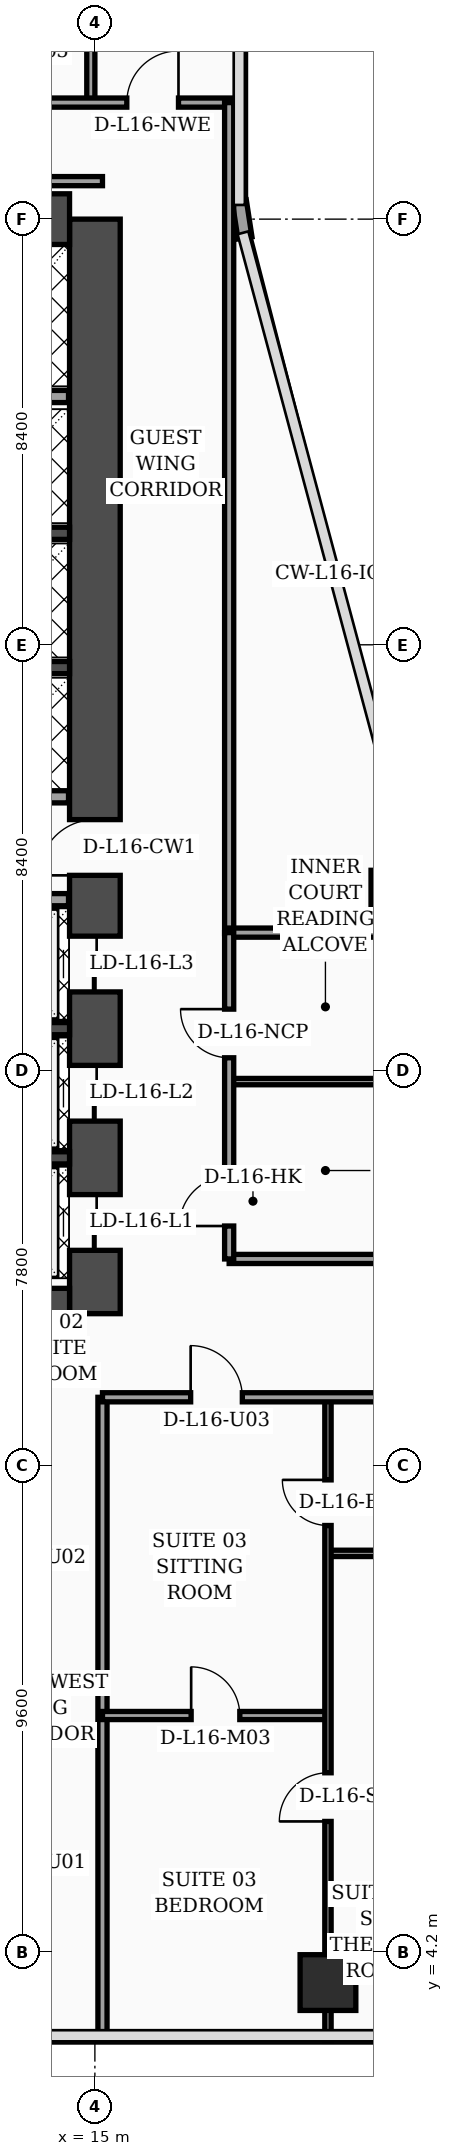
"""IFC4 building model, lengths in metres.
Left out: names, types, materials, properties, quantities, classifications, styles, units other than length and angle.
Written with IfcOpenShell. Run it as: python <this file> out.ifc"""

import sys

from ifc_helpers import new_model, si_unit, direction, frame, frame_2d, origin, origin_2d, place, context, subcontext, project, spatial, rectangle, hollow_rectangle, extrude, element, fill, save


model = new_model("IFC4")
c1 = context("Model", 3, precision=1e-05, world=origin(), true_north=direction((0.0, 1.0)))
c2 = subcontext(c1, "Body", "Model", "MODEL_VIEW")
j1 = project(units=[si_unit("LENGTHUNIT", "METRE"), si_unit("PLANEANGLEUNIT", "RADIAN")], contexts=[c1])
p1 = place(None, origin())
s1 = spatial("IfcSite", under=j1, at=p1, CompositionType="ELEMENT")
p2 = place(p1, origin())
s2 = spatial("IfcBuilding", under=s1, at=p2, CompositionType="ELEMENT")
p3 = place(p2, frame((0.0, 0.0, 69.8)))
s3 = spatial("IfcBuildingStorey", under=s2, at=p3, CompositionType="ELEMENT", Elevation=69.8)
p4 = place(p3, frame((15.0, 16.8, 0.0), z_axis=(0.0, 0.0, 1.0), x_axis=(0.0, 1.0, 0.0)))
e1 = element("IfcWall", 1, at=p4, inside=s3, PredefinedType="SHEAR", context=c2, shape_type="SweptSolid", body=[
    extrude(rectangle(XDim=21.6, YDim=1.0, at=frame_2d((10.8, 0.0))), origin(), (0.0, 0.0, 1.0), 3.56),
])
p5 = place(p4, frame((8.65, 0.0, 0.0)))
e2 = element("IfcOpeningElement", 2, at=p5, cuts=e1, PredefinedType="OPENING", context=c2, shape_type="SweptSolid", body=[
    extrude(rectangle(XDim=1.1, YDim=2.2, at=frame_2d((0.55, 1.1))), frame((0.0, 0.51, 0.0), z_axis=(0.0, -1.0, 0.0), x_axis=(1.0, 0.0, 0.0)), (0.0, 0.0, 1.0), 1.02),
])
p6 = place(p4, frame((1.25, 0.0, 0.0)))
e3 = element("IfcOpeningElement", 3, at=p6, cuts=e1, PredefinedType="OPENING", context=c2, shape_type="SweptSolid", body=[
    extrude(rectangle(XDim=1.1, YDim=2.2, at=frame_2d((0.55, 1.1))), frame((0.0, 0.51, 0.0), z_axis=(0.0, -1.0, 0.0), x_axis=(1.0, 0.0, 0.0)), (0.0, 0.0, 1.0), 1.02),
])
p7 = place(p4, frame((3.8, 0.0, 0.0)))
e4 = element("IfcOpeningElement", 4, at=p7, cuts=e1, PredefinedType="OPENING", context=c2, shape_type="SweptSolid", body=[
    extrude(rectangle(XDim=1.1, YDim=2.2, at=frame_2d((0.55, 1.1))), frame((0.0, 0.51, 0.0), z_axis=(0.0, -1.0, 0.0), x_axis=(1.0, 0.0, 0.0)), (0.0, 0.0, 1.0), 1.02),
])
p8 = place(p4, frame((6.35, 0.0, 0.0)))
e5 = element("IfcOpeningElement", 5, at=p8, cuts=e1, PredefinedType="OPENING", context=c2, shape_type="SweptSolid", body=[
    extrude(rectangle(XDim=1.1, YDim=2.2, at=frame_2d((0.55, 1.1))), frame((0.0, 0.51, 0.0), z_axis=(0.0, -1.0, 0.0), x_axis=(1.0, 0.0, 0.0)), (0.0, 0.0, 1.0), 1.02),
])
for number, where, z_axis, x_axis in (
    (6, (4.7, 38.4, 0.0), (0.0, 0.0, 1.0), (1.0, 0.0, 0.0)),
    (7, (4.7, 16.8, 0.0), (0.0, 0.0, 1.0), (1.0, 0.0, 0.0)),
):
    element("IfcWall", number, at=place(p3, frame(where, z_axis=z_axis, x_axis=x_axis)), inside=s3, PredefinedType="SHEAR", context=c2, shape_type="SweptSolid", body=[
        extrude(rectangle(XDim=9.8, YDim=1.0, at=frame_2d((4.9, 0.0))), origin(), (0.0, 0.0, 1.0), 3.56),
    ])
for number, where, z_axis, x_axis in (
    (8, (12.18, 19.875, 0.0), (0.0, 0.0, 1.0), (1.0, 0.0, 0.0)),
    (9, (12.18, 22.425, 0.0), (0.0, 0.0, 1.0), (1.0, 0.0, 0.0)),
    (10, (12.18, 29.55, 0.0), (0.0, 0.0, 1.0), (1.0, 0.0, 0.0)),
    (11, (12.18, 32.2, 0.0), (0.0, 0.0, 1.0), (1.0, 0.0, 0.0)),
):
    element("IfcWall", number, at=place(p3, frame(where, z_axis=z_axis, x_axis=x_axis)), inside=s3, PredefinedType="SOLIDWALL", context=c2, shape_type="SweptSolid", body=[
        extrude(rectangle(XDim=2.32, YDim=0.24, at=frame_2d((1.16, 0.0))), origin(), (0.0, 0.0, 1.0), 3.56),
    ])
for number, where, z_axis, x_axis in (
    (12, (21.0, 25.0, 0.0), (0.0, 0.0, 1.0), (1.0, 0.0, 0.0)),
    (13, (19.6, 3.6, 0.0), (0.0, 0.0, 1.0), (1.0, 0.0, 0.0)),
):
    element("IfcColumn", number, at=place(p3, frame(where, z_axis=z_axis, x_axis=x_axis)), inside=s3, PredefinedType="COLUMN", context=c2, shape_type="SweptSolid", body=[
        extrude(hollow_rectangle(XDim=1.1, YDim=1.1, WallThickness=0.045, at=origin_2d()), origin(), (0.0, 0.0, 1.0), 3.56),
    ])
p9 = place(p3, frame((17.962, 38.03, 0.0), z_axis=(0.0, 0.0, 1.0), x_axis=(-0.15141125477, 0.988470855377, 0.0)))
e14 = element("IfcWall", 14, at=p9, inside=s3, PredefinedType="SOLIDWALL", context=c2, shape_type="SweptSolid", body=[
    extrude(rectangle(XDim=0.739, YDim=0.28, at=frame_2d((0.369, 0.0))), origin(), (0.0, 0.0, 1.0), 3.56),
])
p10 = place(p3, frame((12.15, 24.97, 0.0), z_axis=(0.0, 0.0, 1.0), x_axis=(1.0, 0.0, 0.0)))
e15 = element("IfcWall", 15, at=p10, inside=s3, PredefinedType="SOLIDWALL", context=c2, shape_type="SweptSolid", body=[
    extrude(rectangle(XDim=2.33, YDim=0.24, at=frame_2d((1.165, 0.0))), origin(), (0.0, 0.0, 1.0), 2.84),
])
p11 = place(p3, frame((12.25, 27.0, 0.0), z_axis=(0.0, 0.0, 1.0), x_axis=(1.0, 0.0, 0.0)))
e16 = element("IfcWall", 16, at=p11, inside=s3, PredefinedType="SOLIDWALL", context=c2, shape_type="SweptSolid", body=[
    extrude(rectangle(XDim=2.23, YDim=0.24, at=frame_2d((1.115, 0.0))), origin(), (0.0, 0.0, 1.0), 3.56),
])
p12 = place(p3, frame((9.66, 34.9, 0.0), z_axis=(0.0, 0.0, 1.0), x_axis=(1.0, 0.0, 0.0)))
e17 = element("IfcWall", 17, at=p12, inside=s3, PredefinedType="SOLIDWALL", context=c2, shape_type="SweptSolid", body=[
    extrude(rectangle(XDim=4.82, YDim=0.24, at=frame_2d((2.41, 0.0))), origin(), (0.0, 0.0, 1.0), 3.56),
])
p13 = place(p3, frame((15.15, 2.44, 0.0), z_axis=(0.0, 0.0, 1.0), x_axis=(0.0, 1.0, 0.0)))
e18 = element("IfcWall", 18, at=p13, inside=s3, PredefinedType="PARTITIONING", context=c2, shape_type="SweptSolid", body=[
    extrude(rectangle(XDim=12.71, YDim=0.18, at=frame_2d((6.355, 0.0))), origin(), (0.0, 0.0, 1.0), 3.04),
])
p14 = place(p3, frame((19.6, 12.07, 0.0), z_axis=(0.0, 0.0, 1.0), x_axis=(1.0, 0.0, 0.0)))
e19 = element("IfcWall", 19, at=p14, inside=s3, PredefinedType="PARTITIONING", context=c2, shape_type="SweptSolid", body=[
    extrude(rectangle(XDim=2.0, YDim=0.125, at=frame_2d((1.0, 0.0))), origin(), (0.0, 0.0, 1.0), 3.56),
])
p15 = place(p3, frame((15.15, 8.87, 0.0), z_axis=(0.0, 0.0, 1.0), x_axis=(1.0, 0.0, 0.0)))
e20 = element("IfcWall", 20, at=p15, inside=s3, PredefinedType="PARTITIONING", context=c2, shape_type="SweptSolid", body=[
    extrude(rectangle(XDim=4.45, YDim=0.16, at=frame_2d((2.225, 0.0))), origin(), (0.0, 0.0, 1.0), 3.56),
])
p16 = place(p15, frame((1.75, 0.0, 0.0)))
e21 = element("IfcOpeningElement", 21, at=p16, cuts=e20, PredefinedType="OPENING", context=c2, shape_type="SweptSolid", body=[
    extrude(rectangle(XDim=0.96, YDim=2.2, at=frame_2d((0.48, 1.1))), frame((0.0, 0.09, 0.0), z_axis=(0.0, -1.0, 0.0), x_axis=(1.0, 0.0, 0.0)), (0.0, 0.0, 1.0), 0.18),
])
p17 = place(p3, frame((19.6, 2.44, 0.0), z_axis=(0.0, 0.0, 1.0), x_axis=(0.0, 1.0, 0.0)))
e22 = element("IfcWall", 22, at=p17, inside=s3, PredefinedType="PARTITIONING", context=c2, shape_type="SweptSolid", body=[
    extrude(rectangle(XDim=12.71, YDim=0.125, at=frame_2d((6.355, 0.0))), origin(), (0.0, 0.0, 1.0), 2.34),
])
p18 = place(p17, frame((4.34, 0.0, 0.0)))
e23 = element("IfcOpeningElement", 23, at=p18, cuts=e22, PredefinedType="OPENING", context=c2, shape_type="SweptSolid", body=[
    extrude(rectangle(XDim=0.96, YDim=2.2, at=frame_2d((0.48, 1.1))), frame((0.0, 0.073, 0.0), z_axis=(0.0, -1.0, 0.0), x_axis=(1.0, 0.0, 0.0)), (0.0, 0.0, 1.0), 0.145),
])
p19 = place(p17, frame((10.18, 0.0, 0.0)))
e24 = element("IfcOpeningElement", 24, at=p19, cuts=e22, PredefinedType="OPENING", context=c2, shape_type="SweptSolid", body=[
    extrude(rectangle(XDim=0.9, YDim=2.15, at=frame_2d((0.45, 1.075))), frame((0.0, 0.073, 0.0), z_axis=(0.0, -1.0, 0.0), x_axis=(1.0, 0.0, 0.0)), (0.0, 0.0, 1.0), 0.145),
])
p20 = place(p3, frame((15.15, 15.15, 0.0), z_axis=(0.0, 0.0, 1.0), x_axis=(1.0, 0.0, 0.0)))
e25 = element("IfcWall", 25, at=p20, inside=s3, PredefinedType="PARTITIONING", context=c2, shape_type="SweptSolid", body=[
    extrude(rectangle(XDim=6.45, YDim=0.18, at=frame_2d((3.225, 0.0))), origin(), (0.0, 0.0, 1.0), 2.34),
])
p21 = place(p20, frame((1.74, 0.0, 0.0)))
e26 = element("IfcOpeningElement", 26, at=p21, cuts=e25, PredefinedType="OPENING", context=c2, shape_type="SweptSolid", body=[
    extrude(rectangle(XDim=1.02, YDim=2.2, at=frame_2d((0.51, 1.1))), frame((0.0, 0.1, 0.0), z_axis=(0.0, -1.0, 0.0), x_axis=(1.0, 0.0, 0.0)), (0.0, 0.0, 1.0), 0.2),
])
p22 = place(p3, frame((14.92, 40.7, 0.0), z_axis=(0.0, 0.0, 1.0), x_axis=(0.0, 1.0, 0.0)))
e27 = element("IfcWall", 27, at=p22, inside=s3, PredefinedType="PARTITIONING", context=c2, shape_type="SweptSolid", body=[
    extrude(rectangle(XDim=7.1, YDim=0.16, at=frame_2d((3.55, 0.0))), origin(), (0.0, 0.0, 1.0), 3.04),
])
p23 = place(p3, frame((0.08, 40.7, 0.0), z_axis=(0.0, 0.0, 1.0), x_axis=(1.0, 0.0, 0.0)))
e28 = element("IfcWall", 28, at=p23, inside=s3, PredefinedType="PARTITIONING", context=c2, shape_type="SweptSolid", body=[
    extrude(rectangle(XDim=17.77, YDim=0.18, at=frame_2d((8.885, 0.0))), origin(), (0.0, 0.0, 1.0), 2.84),
])
p24 = place(p23, frame((0.9, 0.0, 0.0)))
e29 = element("IfcOpeningElement", 29, at=p24, cuts=e28, PredefinedType="OPENING", context=c2, shape_type="SweptSolid", body=[
    extrude(rectangle(XDim=1.02, YDim=2.2, at=frame_2d((0.51, 1.1))), frame((0.0, 0.1, 0.0), z_axis=(0.0, -1.0, 0.0), x_axis=(1.0, 0.0, 0.0)), (0.0, 0.0, 1.0), 0.2),
])
p25 = place(p23, frame((4.75, 0.0, 0.0)))
e30 = element("IfcOpeningElement", 30, at=p25, cuts=e28, PredefinedType="OPENING", context=c2, shape_type="SweptSolid", body=[
    extrude(rectangle(XDim=1.02, YDim=2.2, at=frame_2d((0.51, 1.1))), frame((0.0, 0.1, 0.0), z_axis=(0.0, -1.0, 0.0), x_axis=(1.0, 0.0, 0.0)), (0.0, 0.0, 1.0), 0.2),
])
p26 = place(p23, frame((10.63, 0.0, 0.0)))
e31 = element("IfcOpeningElement", 31, at=p26, cuts=e28, PredefinedType="OPENING", context=c2, shape_type="SweptSolid", body=[
    extrude(rectangle(XDim=1.02, YDim=2.2, at=frame_2d((0.51, 1.1))), frame((0.0, 0.1, 0.0), z_axis=(0.0, -1.0, 0.0), x_axis=(1.0, 0.0, 0.0)), (0.0, 0.0, 1.0), 0.2),
])
p27 = place(p23, frame((15.55, 0.0, 0.0)))
e32 = element("IfcOpeningElement", 32, at=p27, cuts=e28, PredefinedType="OPENING", context=c2, shape_type="SweptSolid", body=[
    extrude(rectangle(XDim=1.02, YDim=2.2, at=frame_2d((0.51, 1.1))), frame((0.0, 0.1, 0.0), z_axis=(0.0, -1.0, 0.0), x_axis=(1.0, 0.0, 0.0)), (0.0, 0.0, 1.0), 0.2),
])
p28 = place(p3, frame((17.65, 24.3, 0.0), z_axis=(0.0, 0.0, 1.0), x_axis=(0.0, 1.0, 0.0)))
e33 = element("IfcWall", 33, at=p28, inside=s3, PredefinedType="PARTITIONING", context=c2, shape_type="SweptSolid", body=[
    extrude(rectangle(XDim=16.4, YDim=0.18, at=frame_2d((8.2, 0.0))), origin(), (0.0, 0.0, 1.0), 2.84),
])
p29 = place(p3, frame((3.68, 39.15, 0.0), z_axis=(0.0, 0.0, 1.0), x_axis=(1.0, 0.0, 0.0)))
e34 = element("IfcWall", 34, at=p29, inside=s3, PredefinedType="PARTITIONING", context=c2, shape_type="SweptSolid", body=[
    extrude(rectangle(XDim=11.47, YDim=0.18, at=frame_2d((5.735, 0.0))), origin(), (0.0, 0.0, 1.0), 2.84),
])
p30 = place(p3, frame((17.65, 17.88, 0.0), z_axis=(0.0, 0.0, 1.0), x_axis=(1.0, 0.0, 0.0)))
e35 = element("IfcWall", 35, at=p30, inside=s3, PredefinedType="PARTITIONING", context=c2, shape_type="SweptSolid", body=[
    extrude(rectangle(XDim=3.9, YDim=0.18, at=frame_2d((1.95, 0.0))), origin(), (0.0, 0.0, 1.0), 3.56),
])
p31 = place(p3, frame((17.65, 21.38, 0.0), z_axis=(0.0, 0.0, 1.0), x_axis=(1.0, 0.0, 0.0)))
e36 = element("IfcWall", 36, at=p31, inside=s3, PredefinedType="PARTITIONING", context=c2, shape_type="SweptSolid", body=[
    extrude(rectangle(XDim=3.9, YDim=0.125, at=frame_2d((1.95, 0.0))), origin(), (0.0, 0.0, 1.0), 3.56),
])
p32 = place(p3, frame((17.65, 24.32, 0.0), z_axis=(0.0, 0.0, 1.0), x_axis=(1.0, 0.0, 0.0)))
e37 = element("IfcWall", 37, at=p32, inside=s3, PredefinedType="PARTITIONING", context=c2, shape_type="SweptSolid", body=[
    extrude(rectangle(XDim=3.95, YDim=0.18, at=frame_2d((1.975, 0.0))), origin(), (0.0, 0.0, 1.0), 3.56),
])
p33 = place(p3, frame((17.65, 17.88, 0.0), z_axis=(0.0, 0.0, 1.0), x_axis=(0.0, 1.0, 0.0)))
e38 = element("IfcWall", 38, at=p33, inside=s3, PredefinedType="PARTITIONING", context=c2, shape_type="SweptSolid", body=[
    extrude(rectangle(XDim=6.44, YDim=0.18, at=frame_2d((3.22, 0.0))), origin(), (0.0, 0.0, 1.0), 3.56),
])
p34 = place(p33, frame((0.65, 0.0, 0.0)))
e39 = element("IfcOpeningElement", 39, at=p34, cuts=e38, PredefinedType="OPENING", context=c2, shape_type="SweptSolid", body=[
    extrude(rectangle(XDim=0.98, YDim=2.15, at=frame_2d((0.49, 1.075))), frame((0.0, 0.1, 0.0), z_axis=(0.0, -1.0, 0.0), x_axis=(1.0, 0.0, 0.0)), (0.0, 0.0, 1.0), 0.2),
])
p35 = place(p33, frame((3.97, 0.0, 0.0)))
e40 = element("IfcOpeningElement", 40, at=p35, cuts=e38, PredefinedType="OPENING", context=c2, shape_type="SweptSolid", body=[
    extrude(rectangle(XDim=0.96, YDim=2.2, at=frame_2d((0.48, 1.1))), frame((0.0, 0.1, 0.0), z_axis=(0.0, -1.0, 0.0), x_axis=(1.0, 0.0, 0.0)), (0.0, 0.0, 1.0), 0.2),
])
p36 = place(p16, origin())
e41 = element("IfcDoor", 41, at=p36, inside=s3, OperationType="SINGLE_SWING_LEFT", PredefinedType="DOOR", context=c2, shape_type="SweptSolid", body=[
    extrude(rectangle(XDim=0.96, YDim=2.2, at=frame_2d((0.48, 1.1))), frame((0.0, 0.025, 0.0), z_axis=(0.0, -1.0, 0.0), x_axis=(1.0, 0.0, 0.0)), (0.0, 0.0, 1.0), 0.05),
])
fill(e21, e41)
p37 = place(p18, origin())
e42 = element("IfcDoor", 42, at=p37, inside=s3, OperationType="SINGLE_SWING_LEFT", PredefinedType="DOOR", context=c2, shape_type="SweptSolid", body=[
    extrude(rectangle(XDim=0.96, YDim=2.2, at=frame_2d((0.48, 1.1))), frame((0.0, 0.025, 0.0), z_axis=(0.0, -1.0, 0.0), x_axis=(1.0, 0.0, 0.0)), (0.0, 0.0, 1.0), 0.05),
])
fill(e23, e42)
p38 = place(p19, origin())
e43 = element("IfcDoor", 43, at=p38, inside=s3, OperationType="SINGLE_SWING_RIGHT", PredefinedType="DOOR", context=c2, shape_type="SweptSolid", body=[
    extrude(rectangle(XDim=0.9, YDim=2.15, at=frame_2d((0.45, 1.075))), frame((0.0, 0.025, 0.0), z_axis=(0.0, -1.0, 0.0), x_axis=(1.0, 0.0, 0.0)), (0.0, 0.0, 1.0), 0.05),
])
fill(e24, e43)
p39 = place(p21, origin())
e44 = element("IfcDoor", 44, at=p39, inside=s3, OperationType="SINGLE_SWING_LEFT", PredefinedType="DOOR", context=c2, shape_type="SweptSolid", body=[
    extrude(rectangle(XDim=1.02, YDim=2.2, at=frame_2d((0.51, 1.1))), frame((0.0, 0.025, 0.0), z_axis=(0.0, -1.0, 0.0), x_axis=(1.0, 0.0, 0.0)), (0.0, 0.0, 1.0), 0.05),
])
fill(e26, e44)
p40 = place(p27, origin())
e45 = element("IfcDoor", 45, at=p40, inside=s3, OperationType="SINGLE_SWING_RIGHT", PredefinedType="DOOR", context=c2, shape_type="SweptSolid", body=[
    extrude(rectangle(XDim=1.02, YDim=2.2, at=frame_2d((0.51, 1.1))), frame((0.0, 0.025, 0.0), z_axis=(0.0, -1.0, 0.0), x_axis=(1.0, 0.0, 0.0)), (0.0, 0.0, 1.0), 0.05),
])
fill(e32, e45)
p41 = place(p34, origin())
e46 = element("IfcDoor", 46, at=p41, inside=s3, OperationType="SINGLE_SWING_LEFT", PredefinedType="DOOR", context=c2, shape_type="SweptSolid", body=[
    extrude(rectangle(XDim=0.98, YDim=2.15, at=frame_2d((0.49, 1.075))), frame((0.0, 0.025, 0.0), z_axis=(0.0, -1.0, 0.0), x_axis=(1.0, 0.0, 0.0)), (0.0, 0.0, 1.0), 0.05),
])
fill(e39, e46)
p42 = place(p35, origin())
e47 = element("IfcDoor", 47, at=p42, inside=s3, OperationType="SINGLE_SWING_RIGHT", PredefinedType="DOOR", context=c2, shape_type="SweptSolid", body=[
    extrude(rectangle(XDim=0.96, YDim=2.2, at=frame_2d((0.48, 1.1))), frame((0.0, 0.025, 0.0), z_axis=(0.0, -1.0, 0.0), x_axis=(1.0, 0.0, 0.0)), (0.0, 0.0, 1.0), 0.05),
])
fill(e40, e47)
p43 = place(p5, origin())
e48 = element("IfcDoor", 48, at=p43, inside=s3, OperationType="SINGLE_SWING_LEFT", PredefinedType="DOOR", context=c2, shape_type="SweptSolid", body=[
    extrude(rectangle(XDim=1.1, YDim=2.2, at=frame_2d((0.55, 1.1))), frame((0.0, 0.025, 0.0), z_axis=(0.0, -1.0, 0.0), x_axis=(1.0, 0.0, 0.0)), (0.0, 0.0, 1.0), 0.05),
])
fill(e2, e48)
p44 = place(p6, origin())
e49 = element("IfcDoor", 49, at=p44, inside=s3, OperationType="DOUBLE_DOOR_SLIDING", PredefinedType="DOOR", context=c2, shape_type="SweptSolid", body=[
    extrude(rectangle(XDim=1.1, YDim=2.2, at=frame_2d((0.55, 1.1))), frame((0.0, 0.025, 0.0), z_axis=(0.0, -1.0, 0.0), x_axis=(1.0, 0.0, 0.0)), (0.0, 0.0, 1.0), 0.05),
])
fill(e3, e49)
p45 = place(p7, origin())
e50 = element("IfcDoor", 50, at=p45, inside=s3, OperationType="DOUBLE_DOOR_SLIDING", PredefinedType="DOOR", context=c2, shape_type="SweptSolid", body=[
    extrude(rectangle(XDim=1.1, YDim=2.2, at=frame_2d((0.55, 1.1))), frame((0.0, 0.025, 0.0), z_axis=(0.0, -1.0, 0.0), x_axis=(1.0, 0.0, 0.0)), (0.0, 0.0, 1.0), 0.05),
])
fill(e4, e50)
p46 = place(p8, origin())
e51 = element("IfcDoor", 51, at=p46, inside=s3, OperationType="DOUBLE_DOOR_SLIDING", PredefinedType="DOOR", context=c2, shape_type="SweptSolid", body=[
    extrude(rectangle(XDim=1.1, YDim=2.2, at=frame_2d((0.55, 1.1))), frame((0.0, 0.025, 0.0), z_axis=(0.0, -1.0, 0.0), x_axis=(1.0, 0.0, 0.0)), (0.0, 0.0, 1.0), 0.05),
])
fill(e5, e51)
save(model, sys.argv[1])
